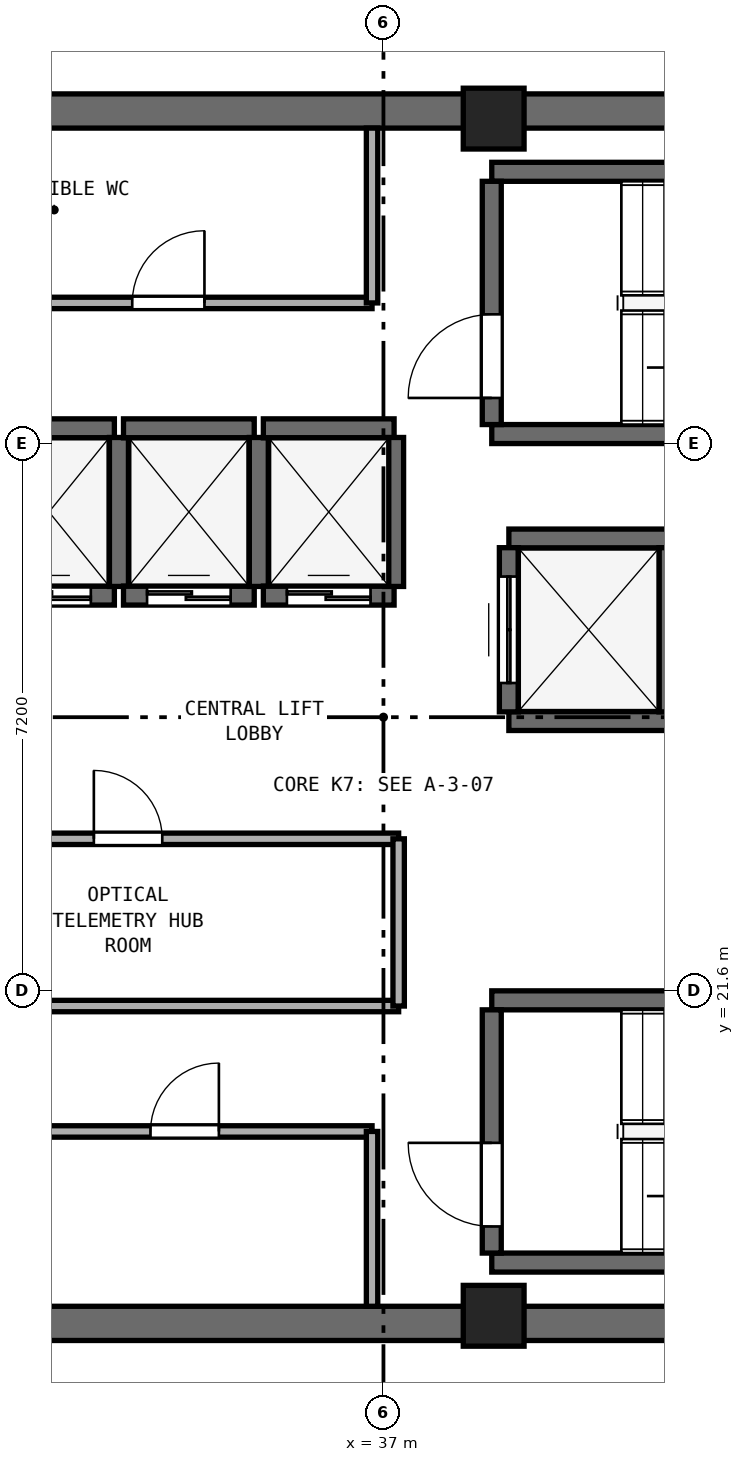
"""IFC4 building model, lengths in metres.
Left out: names, types, materials, properties, quantities, classifications, styles, units other than length and angle.
Written with IfcOpenShell. Run it as: python <this file> out.ifc"""

import sys

from ifc_helpers import new_model, si_unit, direction, frame, frame_2d, origin, origin_2d, place, context, subcontext, project, spatial, rectangle, extrude, element, fill, save


model = new_model("IFC4")
c1 = context("Model", 3, precision=1e-05, world=origin(), true_north=direction((0.0, 1.0)))
c2 = subcontext(c1, "Body", "Model", "MODEL_VIEW")
j1 = project(units=[si_unit("LENGTHUNIT", "METRE"), si_unit("PLANEANGLEUNIT", "RADIAN")], contexts=[c1])
p1 = place(None, origin())
s1 = spatial("IfcSite", under=j1, at=p1, CompositionType="ELEMENT")
p2 = place(p1, origin())
s2 = spatial("IfcBuilding", under=s1, at=p2, CompositionType="ELEMENT")
p3 = place(p2, frame((0.0, 0.0, 228.8)))
s3 = spatial("IfcBuildingStorey", under=s2, at=p3, CompositionType="ELEMENT", Elevation=228.8)
for number, where, z_axis, x_axis in (
    (1, (25.4, 17.225, 0.0), (0.0, 0.0, 1.0), (1.0, 0.0, 0.0)),
    (2, (25.4, 33.175, 0.0), (0.0, 0.0, 1.0), (1.0, 0.0, 0.0)),
):
    element("IfcWall", number, at=place(p3, frame(where, z_axis=z_axis, x_axis=x_axis)), inside=s3, PredefinedType="SHEAR", context=c2, shape_type="SweptSolid", body=[
        extrude(rectangle(XDim=23.2, YDim=0.45, at=frame_2d((11.6, 0.0))), origin(), (0.0, 0.0, 1.0), 3.51),
    ])
for number, where, z_axis, x_axis in (
    (3, (38.45, 17.325, 0.0), (0.0, 0.0, 1.0), (1.0, 0.0, 0.0)),
    (4, (38.45, 33.075, 0.0), (0.0, 0.0, 1.0), (1.0, 0.0, 0.0)),
):
    element("IfcColumn", number, at=place(p3, frame(where, z_axis=z_axis, x_axis=x_axis)), inside=s3, PredefinedType="PILASTER", context=c2, shape_type="SweptSolid", body=[
        extrude(rectangle(XDim=0.8, YDim=0.8, at=origin_2d()), origin(), (0.0, 0.0, 1.0), 3.8),
    ])
for number, where, z_axis, x_axis in (
    (5, (38.425, 28.925, 0.0), (0.0, 0.0, 1.0), (1.0, 0.0, 0.0)),
    (6, (38.425, 32.375, 0.0), (0.0, 0.0, 1.0), (1.0, 0.0, 0.0)),
):
    element("IfcWall", number, at=place(p3, frame(where, z_axis=z_axis, x_axis=x_axis)), inside=s3, PredefinedType="SHEAR", context=c2, shape_type="SweptSolid", body=[
        extrude(rectangle(XDim=7.3, YDim=0.25, at=frame_2d((3.65, 0.0))), origin(), (0.0, 0.0, 1.0), 3.51),
    ])
p4 = place(p3, frame((38.425, 29.05, 0.0), z_axis=(0.0, 0.0, 1.0), x_axis=(0.0, 1.0, 0.0)))
e7 = element("IfcWall", 7, at=p4, inside=s3, PredefinedType="SHEAR", context=c2, shape_type="SweptSolid", body=[
    extrude(rectangle(XDim=3.2, YDim=0.25, at=frame_2d((1.6, 0.0))), origin(), (0.0, 0.0, 1.0), 3.51),
])
p5 = place(p4, frame((0.35, 0.0, 0.0)))
e8 = element("IfcOpeningElement", 8, at=p5, cuts=e7, PredefinedType="OPENING", context=c2, shape_type="SweptSolid", body=[
    extrude(rectangle(XDim=1.1, YDim=2.15, at=frame_2d((0.55, 1.075))), frame((0.0, 0.135, 0.0), z_axis=(0.0, -1.0, 0.0), x_axis=(1.0, 0.0, 0.0)), (0.0, 0.0, 1.0), 0.27),
])
for number, where, z_axis, x_axis in (
    (9, (38.425, 18.025, 0.0), (0.0, 0.0, 1.0), (1.0, 0.0, 0.0)),
    (10, (38.425, 21.475, 0.0), (0.0, 0.0, 1.0), (1.0, 0.0, 0.0)),
):
    element("IfcWall", number, at=place(p3, frame(where, z_axis=z_axis, x_axis=x_axis)), inside=s3, PredefinedType="SHEAR", context=c2, shape_type="SweptSolid", body=[
        extrude(rectangle(XDim=7.3, YDim=0.25, at=frame_2d((3.65, 0.0))), origin(), (0.0, 0.0, 1.0), 3.51),
    ])
p6 = place(p3, frame((38.425, 18.15, 0.0), z_axis=(0.0, 0.0, 1.0), x_axis=(0.0, 1.0, 0.0)))
e11 = element("IfcWall", 11, at=p6, inside=s3, PredefinedType="SHEAR", context=c2, shape_type="SweptSolid", body=[
    extrude(rectangle(XDim=3.2, YDim=0.25, at=frame_2d((1.6, 0.0))), origin(), (0.0, 0.0, 1.0), 3.51),
])
p7 = place(p6, frame((0.35, 0.0, 0.0)))
e12 = element("IfcOpeningElement", 12, at=p7, cuts=e11, PredefinedType="OPENING", context=c2, shape_type="SweptSolid", body=[
    extrude(rectangle(XDim=1.1, YDim=2.15, at=frame_2d((0.55, 1.075))), frame((0.0, 0.135, 0.0), z_axis=(0.0, -1.0, 0.0), x_axis=(1.0, 0.0, 0.0)), (0.0, 0.0, 1.0), 0.27),
])
p8 = place(p3, frame((31.74, 26.8, 0.0), z_axis=(0.0, 0.0, 1.0), x_axis=(1.0, 0.0, 0.0)))
e13 = element("IfcWall", 13, at=p8, inside=s3, PredefinedType="SHEAR", context=c2, shape_type="SweptSolid", body=[
    extrude(rectangle(XDim=1.72, YDim=0.25, at=frame_2d((0.86, 0.0))), origin(), (0.0, 0.0, 1.0), 3.51),
])
p9 = place(p8, frame((0.31, 0.0, 0.0)))
e14 = element("IfcOpeningElement", 14, at=p9, cuts=e13, PredefinedType="OPENING", context=c2, shape_type="SweptSolid", body=[
    extrude(rectangle(XDim=1.1, YDim=2.15, at=frame_2d((0.55, 1.075))), frame((0.0, 0.135, 0.0), z_axis=(0.0, -1.0, 0.0), x_axis=(1.0, 0.0, 0.0)), (0.0, 0.0, 1.0), 0.27),
])
p10 = place(p3, frame((31.74, 29.0, 0.0), z_axis=(0.0, 0.0, 1.0), x_axis=(1.0, 0.0, 0.0)))
e15 = element("IfcWall", 15, at=p10, inside=s3, PredefinedType="SHEAR", context=c2, shape_type="SweptSolid", body=[
    extrude(rectangle(XDim=1.72, YDim=0.25, at=frame_2d((0.86, 0.0))), origin(), (0.0, 0.0, 1.0), 3.51),
])
p11 = place(p3, frame((33.52, 26.92, 0.0), z_axis=(0.0, 0.0, 1.0), x_axis=(0.0, 1.0, 0.0)))
e16 = element("IfcWall", 16, at=p11, inside=s3, PredefinedType="SHEAR", context=c2, shape_type="SweptSolid", body=[
    extrude(rectangle(XDim=1.96, YDim=0.25, at=frame_2d((0.98, 0.0))), origin(), (0.0, 0.0, 1.0), 3.51),
])
p12 = place(p3, frame((33.58, 26.8, 0.0), z_axis=(0.0, 0.0, 1.0), x_axis=(1.0, 0.0, 0.0)))
e17 = element("IfcWall", 17, at=p12, inside=s3, PredefinedType="SHEAR", context=c2, shape_type="SweptSolid", body=[
    extrude(rectangle(XDim=1.72, YDim=0.25, at=frame_2d((0.86, 0.0))), origin(), (0.0, 0.0, 1.0), 3.51),
])
p13 = place(p12, frame((0.31, 0.0, 0.0)))
e18 = element("IfcOpeningElement", 18, at=p13, cuts=e17, PredefinedType="OPENING", context=c2, shape_type="SweptSolid", body=[
    extrude(rectangle(XDim=1.1, YDim=2.15, at=frame_2d((0.55, 1.075))), frame((0.0, 0.135, 0.0), z_axis=(0.0, -1.0, 0.0), x_axis=(1.0, 0.0, 0.0)), (0.0, 0.0, 1.0), 0.27),
])
p14 = place(p3, frame((33.58, 29.0, 0.0), z_axis=(0.0, 0.0, 1.0), x_axis=(1.0, 0.0, 0.0)))
e19 = element("IfcWall", 19, at=p14, inside=s3, PredefinedType="SHEAR", context=c2, shape_type="SweptSolid", body=[
    extrude(rectangle(XDim=1.72, YDim=0.25, at=frame_2d((0.86, 0.0))), origin(), (0.0, 0.0, 1.0), 3.51),
])
p15 = place(p3, frame((35.36, 26.92, 0.0), z_axis=(0.0, 0.0, 1.0), x_axis=(0.0, 1.0, 0.0)))
e20 = element("IfcWall", 20, at=p15, inside=s3, PredefinedType="SHEAR", context=c2, shape_type="SweptSolid", body=[
    extrude(rectangle(XDim=1.96, YDim=0.25, at=frame_2d((0.98, 0.0))), origin(), (0.0, 0.0, 1.0), 3.51),
])
p16 = place(p3, frame((35.42, 26.8, 0.0), z_axis=(0.0, 0.0, 1.0), x_axis=(1.0, 0.0, 0.0)))
e21 = element("IfcWall", 21, at=p16, inside=s3, PredefinedType="SHEAR", context=c2, shape_type="SweptSolid", body=[
    extrude(rectangle(XDim=1.72, YDim=0.25, at=frame_2d((0.86, 0.0))), origin(), (0.0, 0.0, 1.0), 3.51),
])
p17 = place(p16, frame((0.31, 0.0, 0.0)))
e22 = element("IfcOpeningElement", 22, at=p17, cuts=e21, PredefinedType="OPENING", context=c2, shape_type="SweptSolid", body=[
    extrude(rectangle(XDim=1.1, YDim=2.15, at=frame_2d((0.55, 1.075))), frame((0.0, 0.135, 0.0), z_axis=(0.0, -1.0, 0.0), x_axis=(1.0, 0.0, 0.0)), (0.0, 0.0, 1.0), 0.27),
])
p18 = place(p3, frame((35.42, 29.0, 0.0), z_axis=(0.0, 0.0, 1.0), x_axis=(1.0, 0.0, 0.0)))
e23 = element("IfcWall", 23, at=p18, inside=s3, PredefinedType="SHEAR", context=c2, shape_type="SweptSolid", body=[
    extrude(rectangle(XDim=1.72, YDim=0.25, at=frame_2d((0.86, 0.0))), origin(), (0.0, 0.0, 1.0), 3.51),
])
p19 = place(p3, frame((37.14, 26.92, 0.0), z_axis=(0.0, 0.0, 1.0), x_axis=(0.0, 1.0, 0.0)))
e24 = element("IfcWall", 24, at=p19, inside=s3, PredefinedType="SHEAR", context=c2, shape_type="SweptSolid", body=[
    extrude(rectangle(XDim=1.96, YDim=0.25, at=frame_2d((0.98, 0.0))), origin(), (0.0, 0.0, 1.0), 3.51),
])
for number, where, z_axis, x_axis in (
    (25, (38.65, 25.15, 0.0), (0.0, 0.0, 1.0), (1.0, 0.0, 0.0)),
    (26, (38.65, 27.55, 0.0), (0.0, 0.0, 1.0), (1.0, 0.0, 0.0)),
):
    element("IfcWall", number, at=place(p3, frame(where, z_axis=z_axis, x_axis=x_axis)), inside=s3, PredefinedType="SHEAR", context=c2, shape_type="SweptSolid", body=[
        extrude(rectangle(XDim=2.1, YDim=0.25, at=frame_2d((1.05, 0.0))), origin(), (0.0, 0.0, 1.0), 3.51),
    ])
p20 = place(p3, frame((38.65, 25.27, 0.0), z_axis=(0.0, 0.0, 1.0), x_axis=(0.0, 1.0, 0.0)))
e27 = element("IfcWall", 27, at=p20, inside=s3, PredefinedType="SHEAR", context=c2, shape_type="SweptSolid", body=[
    extrude(rectangle(XDim=2.16, YDim=0.25, at=frame_2d((1.08, 0.0))), origin(), (0.0, 0.0, 1.0), 3.51),
])
p21 = place(p20, frame((0.38, 0.0, 0.0)))
e28 = element("IfcOpeningElement", 28, at=p21, cuts=e27, PredefinedType="OPENING", context=c2, shape_type="SweptSolid", body=[
    extrude(rectangle(XDim=1.4, YDim=2.2, at=frame_2d((0.7, 1.1))), frame((0.0, 0.135, 0.0), z_axis=(0.0, -1.0, 0.0), x_axis=(1.0, 0.0, 0.0)), (0.0, 0.0, 1.0), 0.27),
])
p22 = place(p3, frame((40.75, 25.27, 0.0), z_axis=(0.0, 0.0, 1.0), x_axis=(0.0, 1.0, 0.0)))
e29 = element("IfcWall", 29, at=p22, inside=s3, PredefinedType="SHEAR", context=c2, shape_type="SweptSolid", body=[
    extrude(rectangle(XDim=2.16, YDim=0.25, at=frame_2d((1.08, 0.0))), origin(), (0.0, 0.0, 1.0), 3.51),
])
p23 = place(p3, frame((31.49, 30.65, 0.0), z_axis=(0.0, 0.0, 1.0), x_axis=(1.0, 0.0, 0.0)))
e30 = element("IfcWall", 30, at=p23, inside=s3, PredefinedType="PARTITIONING", context=c2, shape_type="SweptSolid", body=[
    extrude(rectangle(XDim=5.36, YDim=0.15, at=frame_2d((2.68, 0.0))), origin(), (0.0, 0.0, 1.0), 3.51),
])
p24 = place(p23, frame((2.205, 0.0, 0.0)))
e31 = element("IfcOpeningElement", 31, at=p24, cuts=e30, PredefinedType="OPENING", context=c2, shape_type="SweptSolid", body=[
    extrude(rectangle(XDim=0.95, YDim=2.1, at=frame_2d((0.475, 1.05))), frame((0.0, 0.085, 0.0), z_axis=(0.0, -1.0, 0.0), x_axis=(1.0, 0.0, 0.0)), (0.0, 0.0, 1.0), 0.17),
])
p25 = place(p3, frame((36.85, 30.65, 0.0), z_axis=(0.0, 0.0, 1.0), x_axis=(0.0, 1.0, 0.0)))
e32 = element("IfcWall", 32, at=p25, inside=s3, PredefinedType="PARTITIONING", context=c2, shape_type="SweptSolid", body=[
    extrude(rectangle(XDim=2.3, YDim=0.15, at=frame_2d((1.15, 0.0))), origin(), (0.0, 0.0, 1.0), 3.51),
])
p26 = place(p3, frame((31.92, 19.75, 0.0), z_axis=(0.0, 0.0, 1.0), x_axis=(1.0, 0.0, 0.0)))
e33 = element("IfcWall", 33, at=p26, inside=s3, PredefinedType="PARTITIONING", context=c2, shape_type="SweptSolid", body=[
    extrude(rectangle(XDim=4.93, YDim=0.15, at=frame_2d((2.465, 0.0))), origin(), (0.0, 0.0, 1.0), 3.51),
])
p27 = place(p26, frame((2.015, 0.0, 0.0)))
e34 = element("IfcOpeningElement", 34, at=p27, cuts=e33, PredefinedType="OPENING", context=c2, shape_type="SweptSolid", body=[
    extrude(rectangle(XDim=0.9, YDim=2.1, at=frame_2d((0.45, 1.05))), frame((0.0, 0.085, 0.0), z_axis=(0.0, -1.0, 0.0), x_axis=(1.0, 0.0, 0.0)), (0.0, 0.0, 1.0), 0.17),
])
p28 = place(p3, frame((36.85, 17.45, 0.0), z_axis=(0.0, 0.0, 1.0), x_axis=(0.0, 1.0, 0.0)))
e35 = element("IfcWall", 35, at=p28, inside=s3, PredefinedType="PARTITIONING", context=c2, shape_type="SweptSolid", body=[
    extrude(rectangle(XDim=2.3, YDim=0.15, at=frame_2d((1.15, 0.0))), origin(), (0.0, 0.0, 1.0), 3.51),
])
p29 = place(p3, frame((30.08, 21.4, 0.0), z_axis=(0.0, 0.0, 1.0), x_axis=(1.0, 0.0, 0.0)))
e36 = element("IfcWall", 36, at=p29, inside=s3, PredefinedType="PARTITIONING", context=c2, shape_type="SweptSolid", body=[
    extrude(rectangle(XDim=7.12, YDim=0.15, at=frame_2d((3.56, 0.0))), origin(), (0.0, 0.0, 1.0), 3.51),
])
p30 = place(p3, frame((30.08, 23.6, 0.0), z_axis=(0.0, 0.0, 1.0), x_axis=(1.0, 0.0, 0.0)))
e37 = element("IfcWall", 37, at=p30, inside=s3, PredefinedType="PARTITIONING", context=c2, shape_type="SweptSolid", body=[
    extrude(rectangle(XDim=7.12, YDim=0.15, at=frame_2d((3.56, 0.0))), origin(), (0.0, 0.0, 1.0), 3.51),
])
p31 = place(p30, frame((3.11, 0.0, 0.0)))
e38 = element("IfcOpeningElement", 38, at=p31, cuts=e37, PredefinedType="OPENING", context=c2, shape_type="SweptSolid", body=[
    extrude(rectangle(XDim=0.9, YDim=2.1, at=frame_2d((0.45, 1.05))), frame((0.0, 0.085, 0.0), z_axis=(0.0, -1.0, 0.0), x_axis=(1.0, 0.0, 0.0)), (0.0, 0.0, 1.0), 0.17),
])
p32 = place(p3, frame((37.2, 21.4, 0.0), z_axis=(0.0, 0.0, 1.0), x_axis=(0.0, 1.0, 0.0)))
e39 = element("IfcWall", 39, at=p32, inside=s3, PredefinedType="PARTITIONING", context=c2, shape_type="SweptSolid", body=[
    extrude(rectangle(XDim=2.2, YDim=0.15, at=frame_2d((1.1, 0.0))), origin(), (0.0, 0.0, 1.0), 3.51),
])
p33 = place(p5, origin())
e40 = element("IfcDoor", 40, at=p33, inside=s3, OperationType="SINGLE_SWING_LEFT", PredefinedType="DOOR", context=c2, shape_type="SweptSolid", body=[
    extrude(rectangle(XDim=1.1, YDim=2.15, at=frame_2d((0.55, 1.075))), frame((0.0, 0.025, 0.0), z_axis=(0.0, -1.0, 0.0), x_axis=(1.0, 0.0, 0.0)), (0.0, 0.0, 1.0), 0.05),
])
fill(e8, e40)
p34 = place(p7, origin())
e41 = element("IfcDoor", 41, at=p34, inside=s3, OperationType="SINGLE_SWING_RIGHT", PredefinedType="DOOR", context=c2, shape_type="SweptSolid", body=[
    extrude(rectangle(XDim=1.1, YDim=2.15, at=frame_2d((0.55, 1.075))), frame((0.0, 0.025, 0.0), z_axis=(0.0, -1.0, 0.0), x_axis=(1.0, 0.0, 0.0)), (0.0, 0.0, 1.0), 0.05),
])
fill(e12, e41)
p35 = place(p9, origin())
e42 = element("IfcDoor", 42, at=p35, inside=s3, OperationType="DOUBLE_DOOR_SLIDING", PredefinedType="DOOR", context=c2, shape_type="SweptSolid", body=[
    extrude(rectangle(XDim=1.1, YDim=2.15, at=frame_2d((0.55, 1.075))), frame((0.0, 0.025, 0.0), z_axis=(0.0, -1.0, 0.0), x_axis=(1.0, 0.0, 0.0)), (0.0, 0.0, 1.0), 0.05),
])
fill(e14, e42)
p36 = place(p13, origin())
e43 = element("IfcDoor", 43, at=p36, inside=s3, OperationType="DOUBLE_DOOR_SLIDING", PredefinedType="DOOR", context=c2, shape_type="SweptSolid", body=[
    extrude(rectangle(XDim=1.1, YDim=2.15, at=frame_2d((0.55, 1.075))), frame((0.0, 0.025, 0.0), z_axis=(0.0, -1.0, 0.0), x_axis=(1.0, 0.0, 0.0)), (0.0, 0.0, 1.0), 0.05),
])
fill(e18, e43)
p37 = place(p17, origin())
e44 = element("IfcDoor", 44, at=p37, inside=s3, OperationType="DOUBLE_DOOR_SLIDING", PredefinedType="DOOR", context=c2, shape_type="SweptSolid", body=[
    extrude(rectangle(XDim=1.1, YDim=2.15, at=frame_2d((0.55, 1.075))), frame((0.0, 0.025, 0.0), z_axis=(0.0, -1.0, 0.0), x_axis=(1.0, 0.0, 0.0)), (0.0, 0.0, 1.0), 0.05),
])
fill(e22, e44)
p38 = place(p21, origin())
e45 = element("IfcDoor", 45, at=p38, inside=s3, OperationType="DOUBLE_DOOR_SLIDING", PredefinedType="DOOR", context=c2, shape_type="SweptSolid", body=[
    extrude(rectangle(XDim=1.4, YDim=2.2, at=frame_2d((0.7, 1.1))), frame((0.0, 0.025, 0.0), z_axis=(0.0, -1.0, 0.0), x_axis=(1.0, 0.0, 0.0)), (0.0, 0.0, 1.0), 0.05),
])
fill(e28, e45)
p39 = place(p24, origin())
e46 = element("IfcDoor", 46, at=p39, inside=s3, OperationType="SINGLE_SWING_RIGHT", PredefinedType="DOOR", context=c2, shape_type="SweptSolid", body=[
    extrude(rectangle(XDim=0.95, YDim=2.1, at=frame_2d((0.475, 1.05))), frame((0.0, 0.025, 0.0), z_axis=(0.0, -1.0, 0.0), x_axis=(1.0, 0.0, 0.0)), (0.0, 0.0, 1.0), 0.05),
])
fill(e31, e46)
p40 = place(p27, origin())
e47 = element("IfcDoor", 47, at=p40, inside=s3, OperationType="SINGLE_SWING_RIGHT", PredefinedType="DOOR", context=c2, shape_type="SweptSolid", body=[
    extrude(rectangle(XDim=0.9, YDim=2.1, at=frame_2d((0.45, 1.05))), frame((0.0, 0.025, 0.0), z_axis=(0.0, -1.0, 0.0), x_axis=(1.0, 0.0, 0.0)), (0.0, 0.0, 1.0), 0.05),
])
fill(e34, e47)
p41 = place(p31, origin())
e48 = element("IfcDoor", 48, at=p41, inside=s3, OperationType="SINGLE_SWING_LEFT", PredefinedType="DOOR", context=c2, shape_type="SweptSolid", body=[
    extrude(rectangle(XDim=0.9, YDim=2.1, at=frame_2d((0.45, 1.05))), frame((0.0, 0.025, 0.0), z_axis=(0.0, -1.0, 0.0), x_axis=(1.0, 0.0, 0.0)), (0.0, 0.0, 1.0), 0.05),
])
fill(e38, e48)
save(model, sys.argv[1])
